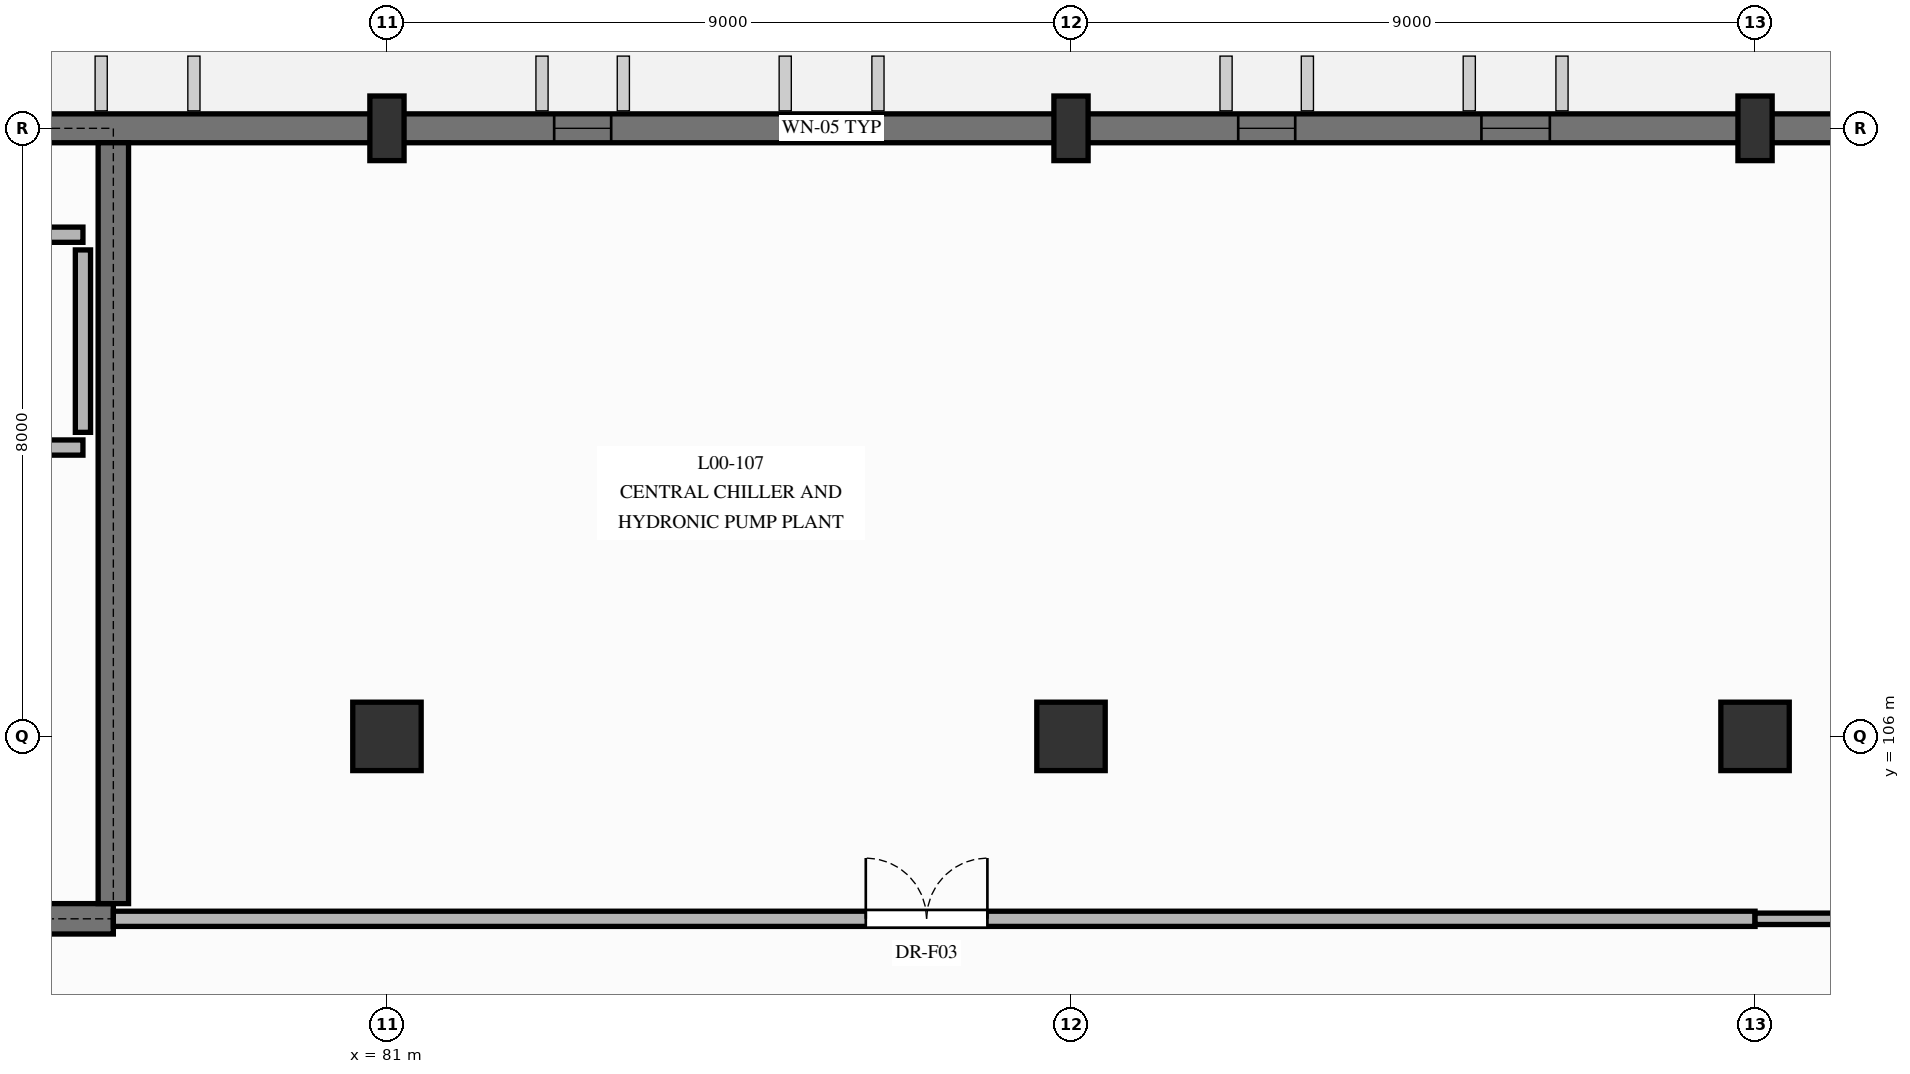
"""IFC4 building model, lengths in metres.
Left out: names, types, materials, properties, quantities, classifications, styles, units other than length and angle.
Written with IfcOpenShell. Run it as: python <this file> out.ifc"""

import sys

from ifc_helpers import new_model, si_unit, direction, frame, frame_2d, origin, origin_2d, place, context, subcontext, project, spatial, rectangle, extrude, element, fill, save


model = new_model("IFC4")
c1 = context("Model", 3, precision=1e-05, world=origin(), true_north=direction((0.0, 1.0)))
c2 = subcontext(c1, "Body", "Model", "MODEL_VIEW")
j1 = project(units=[si_unit("LENGTHUNIT", "METRE"), si_unit("PLANEANGLEUNIT", "RADIAN")], contexts=[c1])
p1 = place(None, origin())
s1 = spatial("IfcSite", under=j1, at=p1, CompositionType="ELEMENT")
p2 = place(p1, origin())
s2 = spatial("IfcBuilding", under=s1, at=p2, CompositionType="ELEMENT")
p3 = place(p2, origin())
s3 = spatial("IfcBuildingStorey", under=s2, at=p3, CompositionType="ELEMENT", Elevation=0.0)
p4 = place(p3, frame((81.0, 106.0, 0.0), z_axis=(0.0, 0.0, 1.0), x_axis=(1.0, 0.0, 0.0)))
e1 = element("IfcColumn", 1, at=p4, inside=s3, PredefinedType="COLUMN", context=c2, shape_type="SweptSolid", body=[
    extrude(rectangle(XDim=0.9, YDim=0.9, at=origin_2d()), origin(), (0.0, 0.0, 1.0), 5.1),
])
p5 = place(p3, frame((81.0, 114.0, 0.0), z_axis=(0.0, 0.0, 1.0), x_axis=(0.0, 1.0, 0.0)))
e2 = element("IfcColumn", 2, at=p5, inside=s3, PredefinedType="COLUMN", context=c2, shape_type="SweptSolid", body=[
    extrude(rectangle(XDim=0.45, YDim=0.85, at=origin_2d()), origin(), (0.0, 0.0, 1.0), 5.1),
])
p6 = place(p3, frame((90.0, 106.0, 0.0), z_axis=(0.0, 0.0, 1.0), x_axis=(1.0, 0.0, 0.0)))
e3 = element("IfcColumn", 3, at=p6, inside=s3, PredefinedType="COLUMN", context=c2, shape_type="SweptSolid", body=[
    extrude(rectangle(XDim=0.9, YDim=0.9, at=origin_2d()), origin(), (0.0, 0.0, 1.0), 5.1),
])
p7 = place(p3, frame((90.0, 114.0, 0.0), z_axis=(0.0, 0.0, 1.0), x_axis=(0.0, 1.0, 0.0)))
e4 = element("IfcColumn", 4, at=p7, inside=s3, PredefinedType="COLUMN", context=c2, shape_type="SweptSolid", body=[
    extrude(rectangle(XDim=0.45, YDim=0.85, at=origin_2d()), origin(), (0.0, 0.0, 1.0), 5.1),
])
p8 = place(p3, frame((99.0, 106.0, 0.0), z_axis=(0.0, 0.0, 1.0), x_axis=(1.0, 0.0, 0.0)))
e5 = element("IfcColumn", 5, at=p8, inside=s3, PredefinedType="COLUMN", context=c2, shape_type="SweptSolid", body=[
    extrude(rectangle(XDim=0.9, YDim=0.9, at=origin_2d()), origin(), (0.0, 0.0, 1.0), 5.1),
])
p9 = place(p3, frame((99.0, 114.0, 0.0), z_axis=(0.0, 0.0, 1.0), x_axis=(0.0, 1.0, 0.0)))
e6 = element("IfcColumn", 6, at=p9, inside=s3, PredefinedType="COLUMN", context=c2, shape_type="SweptSolid", body=[
    extrude(rectangle(XDim=0.45, YDim=0.85, at=origin_2d()), origin(), (0.0, 0.0, 1.0), 5.1),
])
p10 = place(p3, frame((72.0, 114.0, 0.0), z_axis=(0.0, 0.0, 1.0), x_axis=(1.0, 0.0, 0.0)))
e7 = element("IfcWall", 7, at=p10, inside=s3, PredefinedType="SOLIDWALL", context=c2, shape_type="SweptSolid", body=[
    extrude(rectangle(XDim=9.0, YDim=0.38, at=frame_2d((4.5, 0.0))), origin(), (0.0, 0.0, 1.0), 4.8),
])
p11 = place(p10, frame((2.2, 0.0, 1.15)))
e8 = element("IfcOpeningElement", 8, at=p11, cuts=e7, PredefinedType="OPENING", context=c2, shape_type="SweptSolid", body=[
    extrude(rectangle(XDim=0.75, YDim=2.2, at=frame_2d((0.375, 1.1))), frame((0.0, 0.2, 0.0), z_axis=(0.0, -1.0, 0.0), x_axis=(1.0, 0.0, 0.0)), (0.0, 0.0, 1.0), 0.4),
])
p12 = place(p3, frame((81.0, 114.0, 0.0), z_axis=(0.0, 0.0, 1.0), x_axis=(1.0, 0.0, 0.0)))
e9 = element("IfcWall", 9, at=p12, inside=s3, PredefinedType="SOLIDWALL", context=c2, shape_type="SweptSolid", body=[
    extrude(rectangle(XDim=9.0, YDim=0.38, at=frame_2d((4.5, 0.0))), origin(), (0.0, 0.0, 1.0), 4.8),
])
p13 = place(p12, frame((2.2, 0.0, 1.15)))
e10 = element("IfcOpeningElement", 10, at=p13, cuts=e9, PredefinedType="OPENING", context=c2, shape_type="SweptSolid", body=[
    extrude(rectangle(XDim=0.75, YDim=2.2, at=frame_2d((0.375, 1.1))), frame((0.0, 0.2, 0.0), z_axis=(0.0, -1.0, 0.0), x_axis=(1.0, 0.0, 0.0)), (0.0, 0.0, 1.0), 0.4),
])
p14 = place(p12, frame((5.4, 0.0, 1.15)))
e11 = element("IfcOpeningElement", 11, at=p14, cuts=e9, PredefinedType="OPENING", context=c2, shape_type="SweptSolid", body=[
    extrude(rectangle(XDim=0.9, YDim=2.2, at=frame_2d((0.45, 1.1))), frame((0.0, 0.2, 0.0), z_axis=(0.0, -1.0, 0.0), x_axis=(1.0, 0.0, 0.0)), (0.0, 0.0, 1.0), 0.4),
])
p15 = place(p3, frame((90.0, 114.0, 0.0), z_axis=(0.0, 0.0, 1.0), x_axis=(1.0, 0.0, 0.0)))
e12 = element("IfcWall", 12, at=p15, inside=s3, PredefinedType="SOLIDWALL", context=c2, shape_type="SweptSolid", body=[
    extrude(rectangle(XDim=9.0, YDim=0.38, at=frame_2d((4.5, 0.0))), origin(), (0.0, 0.0, 1.0), 4.8),
])
p16 = place(p15, frame((2.2, 0.0, 1.15)))
e13 = element("IfcOpeningElement", 13, at=p16, cuts=e12, PredefinedType="OPENING", context=c2, shape_type="SweptSolid", body=[
    extrude(rectangle(XDim=0.75, YDim=2.2, at=frame_2d((0.375, 1.1))), frame((0.0, 0.2, 0.0), z_axis=(0.0, -1.0, 0.0), x_axis=(1.0, 0.0, 0.0)), (0.0, 0.0, 1.0), 0.4),
])
p17 = place(p15, frame((5.4, 0.0, 1.15)))
e14 = element("IfcOpeningElement", 14, at=p17, cuts=e12, PredefinedType="OPENING", context=c2, shape_type="SweptSolid", body=[
    extrude(rectangle(XDim=0.9, YDim=2.2, at=frame_2d((0.45, 1.1))), frame((0.0, 0.2, 0.0), z_axis=(0.0, -1.0, 0.0), x_axis=(1.0, 0.0, 0.0)), (0.0, 0.0, 1.0), 0.4),
])
p18 = place(p3, frame((99.0, 114.0, 0.0), z_axis=(0.0, 0.0, 1.0), x_axis=(1.0, 0.0, 0.0)))
e15 = element("IfcWall", 15, at=p18, inside=s3, PredefinedType="SOLIDWALL", context=c2, shape_type="SweptSolid", body=[
    extrude(rectangle(XDim=9.0, YDim=0.38, at=frame_2d((4.5, 0.0))), origin(), (0.0, 0.0, 1.0), 4.8),
])
p19 = place(p18, frame((2.2, 0.0, 1.15)))
e16 = element("IfcOpeningElement", 16, at=p19, cuts=e15, PredefinedType="OPENING", context=c2, shape_type="SweptSolid", body=[
    extrude(rectangle(XDim=0.75, YDim=2.2, at=frame_2d((0.375, 1.1))), frame((0.0, 0.2, 0.0), z_axis=(0.0, -1.0, 0.0), x_axis=(1.0, 0.0, 0.0)), (0.0, 0.0, 1.0), 0.4),
])
p20 = place(p18, frame((5.4, 0.0, 1.15)))
e17 = element("IfcOpeningElement", 17, at=p20, cuts=e15, PredefinedType="OPENING", context=c2, shape_type="SweptSolid", body=[
    extrude(rectangle(XDim=0.9, YDim=2.2, at=frame_2d((0.45, 1.1))), frame((0.0, 0.2, 0.0), z_axis=(0.0, -1.0, 0.0), x_axis=(1.0, 0.0, 0.0)), (0.0, 0.0, 1.0), 0.4),
])
p21 = place(p3, frame((64.2, 103.6, 0.0), z_axis=(0.0, 0.0, 1.0), x_axis=(1.0, 0.0, 0.0)))
e18 = element("IfcWall", 18, at=p21, inside=s3, PredefinedType="SHEAR", context=c2, shape_type="SweptSolid", body=[
    extrude(rectangle(XDim=13.2, YDim=0.4, at=frame_2d((6.6, 0.0))), origin(), (0.0, 0.0, 1.0), 4.8),
])
p22 = place(p21, frame((5.8, 0.0, 0.0)))
e19 = element("IfcOpeningElement", 19, at=p22, cuts=e18, PredefinedType="OPENING", context=c2, shape_type="SweptSolid", body=[
    extrude(rectangle(XDim=1.5, YDim=2.2, at=frame_2d((0.75, 1.1))), frame((0.0, 0.21, 0.0), z_axis=(0.0, -1.0, 0.0), x_axis=(1.0, 0.0, 0.0)), (0.0, 0.0, 1.0), 0.42),
])
p23 = place(p3, frame((77.4, 103.8, 0.0), z_axis=(0.0, 0.0, 1.0), x_axis=(0.0, 1.0, 0.0)))
e20 = element("IfcWall", 20, at=p23, inside=s3, PredefinedType="SHEAR", context=c2, shape_type="SweptSolid", body=[
    extrude(rectangle(XDim=10.01, YDim=0.4, at=frame_2d((5.005, 0.0))), origin(), (0.0, 0.0, 1.0), 4.8),
])
p24 = place(p3, frame((75.2, 109.8, 0.0), z_axis=(0.0, 0.0, 1.0), x_axis=(1.0, 0.0, 0.0)))
e21 = element("IfcWall", 21, at=p24, inside=s3, PredefinedType="PARTITIONING", context=c2, shape_type="SweptSolid", body=[
    extrude(rectangle(XDim=1.8, YDim=0.2, at=frame_2d((0.9, 0.0))), origin(), (0.0, 0.0, 1.0), 4.8),
])
p25 = place(p24, frame((0.45, 0.0, 0.0)))
e22 = element("IfcOpeningElement", 22, at=p25, cuts=e21, PredefinedType="OPENING", context=c2, shape_type="SweptSolid", body=[
    extrude(rectangle(XDim=0.9, YDim=2.1, at=frame_2d((0.45, 1.05))), frame((0.0, 0.11, 0.0), z_axis=(0.0, -1.0, 0.0), x_axis=(1.0, 0.0, 0.0)), (0.0, 0.0, 1.0), 0.22),
])
p26 = place(p3, frame((75.2, 112.6, 0.0), z_axis=(0.0, 0.0, 1.0), x_axis=(1.0, 0.0, 0.0)))
e23 = element("IfcWall", 23, at=p26, inside=s3, PredefinedType="PARTITIONING", context=c2, shape_type="SweptSolid", body=[
    extrude(rectangle(XDim=1.8, YDim=0.2, at=frame_2d((0.9, 0.0))), origin(), (0.0, 0.0, 1.0), 4.8),
])
p27 = place(p3, frame((77.0, 110.0, 0.0), z_axis=(0.0, 0.0, 1.0), x_axis=(0.0, 1.0, 0.0)))
e24 = element("IfcWall", 24, at=p27, inside=s3, PredefinedType="PARTITIONING", context=c2, shape_type="SweptSolid", body=[
    extrude(rectangle(XDim=2.4, YDim=0.2, at=frame_2d((1.2, 0.0))), origin(), (0.0, 0.0, 1.0), 4.8),
])
p28 = place(p3, frame((77.4, 103.6, 0.0), z_axis=(0.0, 0.0, 1.0), x_axis=(1.0, 0.0, 0.0)))
e25 = element("IfcWall", 25, at=p28, inside=s3, PredefinedType="PARTITIONING", context=c2, shape_type="SweptSolid", body=[
    extrude(rectangle(XDim=21.6, YDim=0.2, at=frame_2d((10.8, 0.0))), origin(), (0.0, 0.0, 1.0), 4.8),
])
p29 = place(p28, frame((9.9, 0.0, 0.0)))
e26 = element("IfcOpeningElement", 26, at=p29, cuts=e25, PredefinedType="OPENING", context=c2, shape_type="SweptSolid", body=[
    extrude(rectangle(XDim=1.6, YDim=2.2, at=frame_2d((0.8, 1.1))), frame((0.0, 0.11, 0.0), z_axis=(0.0, -1.0, 0.0), x_axis=(1.0, 0.0, 0.0)), (0.0, 0.0, 1.0), 0.22),
])
p30 = place(p3, frame((99.0, 103.6, 0.0), z_axis=(0.0, 0.0, 1.0), x_axis=(1.0, 0.0, 0.0)))
e27 = element("IfcWall", 27, at=p30, inside=s3, PredefinedType="PARTITIONING", context=c2, shape_type="SweptSolid", body=[
    extrude(rectangle(XDim=16.6, YDim=0.15, at=frame_2d((8.3, 0.0))), origin(), (0.0, 0.0, 1.0), 4.8),
])
p31 = place(p30, frame((7.5, 0.0, 0.0)))
e28 = element("IfcOpeningElement", 28, at=p31, cuts=e27, PredefinedType="OPENING", context=c2, shape_type="SweptSolid", body=[
    extrude(rectangle(XDim=1.0, YDim=2.15, at=frame_2d((0.5, 1.075))), frame((0.0, 0.085, 0.0), z_axis=(0.0, -1.0, 0.0), x_axis=(1.0, 0.0, 0.0)), (0.0, 0.0, 1.0), 0.17),
])
p32 = place(p13, origin())
e29 = element("IfcWindow", 29, at=p32, inside=s3, PartitioningType="SINGLE_PANEL", PredefinedType="WINDOW", context=c2, shape_type="SweptSolid", body=[
    extrude(rectangle(XDim=0.75, YDim=2.2, at=frame_2d((0.375, 1.1))), frame((0.0, 0.03, 0.0), z_axis=(0.0, -1.0, 0.0), x_axis=(1.0, 0.0, 0.0)), (0.0, 0.0, 1.0), 0.06),
])
fill(e10, e29)
p33 = place(p14, origin())
e30 = element("IfcWindow", 30, at=p33, inside=s3, PartitioningType="SINGLE_PANEL", PredefinedType="WINDOW", context=c2, shape_type="SweptSolid", body=[
    extrude(rectangle(XDim=0.9, YDim=2.2, at=frame_2d((0.45, 1.1))), frame((0.0, 0.03, 0.0), z_axis=(0.0, -1.0, 0.0), x_axis=(1.0, 0.0, 0.0)), (0.0, 0.0, 1.0), 0.06),
])
fill(e11, e30)
p34 = place(p16, origin())
e31 = element("IfcWindow", 31, at=p34, inside=s3, PartitioningType="SINGLE_PANEL", PredefinedType="WINDOW", context=c2, shape_type="SweptSolid", body=[
    extrude(rectangle(XDim=0.75, YDim=2.2, at=frame_2d((0.375, 1.1))), frame((0.0, 0.03, 0.0), z_axis=(0.0, -1.0, 0.0), x_axis=(1.0, 0.0, 0.0)), (0.0, 0.0, 1.0), 0.06),
])
fill(e13, e31)
p35 = place(p17, origin())
e32 = element("IfcWindow", 32, at=p35, inside=s3, PartitioningType="SINGLE_PANEL", PredefinedType="WINDOW", context=c2, shape_type="SweptSolid", body=[
    extrude(rectangle(XDim=0.9, YDim=2.2, at=frame_2d((0.45, 1.1))), frame((0.0, 0.03, 0.0), z_axis=(0.0, -1.0, 0.0), x_axis=(1.0, 0.0, 0.0)), (0.0, 0.0, 1.0), 0.06),
])
fill(e14, e32)
p36 = place(p29, origin())
e33 = element("IfcDoor", 33, at=p36, inside=s3, OperationType="DOUBLE_DOOR_SINGLE_SWING", PredefinedType="DOOR", context=c2, shape_type="SweptSolid", body=[
    extrude(rectangle(XDim=1.6, YDim=2.2, at=frame_2d((0.8, 1.1))), frame((0.0, 0.025, 0.0), z_axis=(0.0, -1.0, 0.0), x_axis=(1.0, 0.0, 0.0)), (0.0, 0.0, 1.0), 0.05),
])
fill(e26, e33)
save(model, sys.argv[1])
